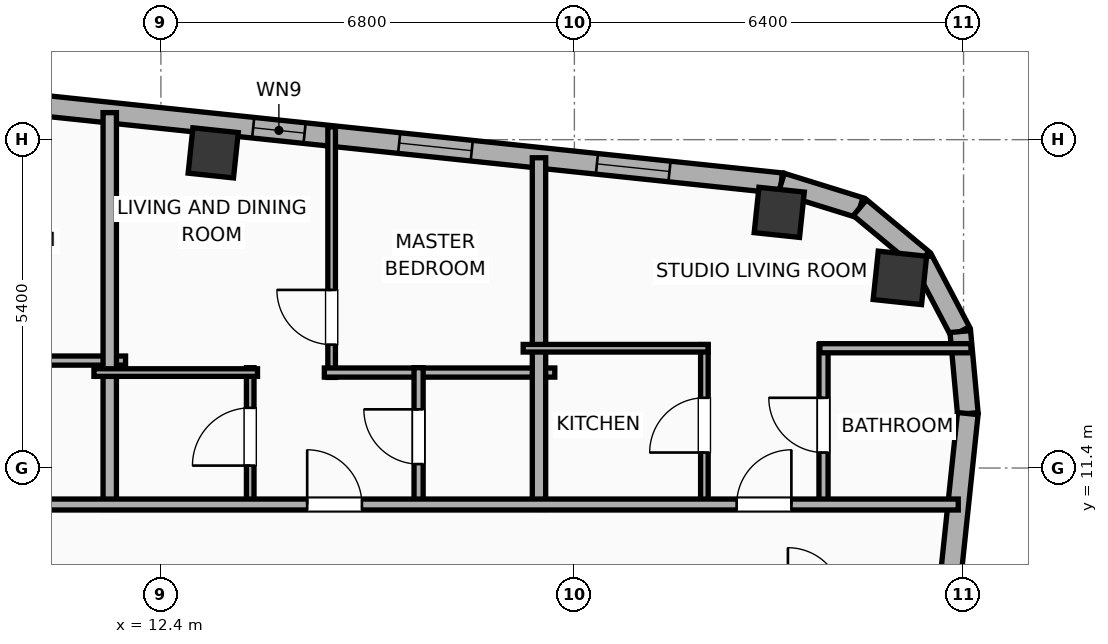
"""IFC4 building model, lengths in metres.
Left out: names, types, materials, properties, quantities, classifications, styles, units other than length and angle.
Written with IfcOpenShell. Run it as: python <this file> out.ifc"""

import sys

from ifc_helpers import new_model, si_unit, direction, frame, frame_2d, origin, origin_2d, place, context, subcontext, project, spatial, rectangle, hollow_rectangle, hollow_circle, extrude, element, fill, save


model = new_model("IFC4")
c1 = context("Model", 3, precision=1e-05, world=origin(), true_north=direction((0.0, 1.0)))
c2 = subcontext(c1, "Body", "Model", "MODEL_VIEW")
j1 = project(units=[si_unit("LENGTHUNIT", "METRE"), si_unit("PLANEANGLEUNIT", "RADIAN")], contexts=[c1])
p1 = place(None, origin())
s1 = spatial("IfcSite", under=j1, at=p1, CompositionType="ELEMENT")
p2 = place(p1, origin())
s2 = spatial("IfcBuilding", under=s1, at=p2, CompositionType="ELEMENT")
p3 = place(p2, frame((0.0, 0.0, 279.5)))
s3 = spatial("IfcBuildingStorey", under=s2, at=p3, CompositionType="ELEMENT", Elevation=279.5)
p4 = place(p3, frame((24.553, 14.527, 0.0), z_axis=(0.0, 0.0, 1.0), x_axis=(0.994521895368, -0.104528463268, 0.0)))
e1 = element("IfcColumn", 1, at=p4, inside=s3, PredefinedType="COLUMN", context=c2, shape_type="SweptSolid", body=[
    extrude(hollow_circle(Radius=0.4, WallThickness=0.028, at=origin_2d()), origin(), (0.0, 0.0, 1.0), 3.9),
])
for number, where, z_axis, x_axis in (
    (2, (22.569, 15.604, 0.0), (0.0, 0.0, 1.0), (0.995, -0.105, 0.0)),
    (3, (13.26, 16.583, 0.0), (0.0, 0.0, 1.0), (0.995, -0.105, 0.0)),
):
    element("IfcColumn", number, at=place(p3, frame(where, z_axis=z_axis, x_axis=x_axis)), inside=s3, PredefinedType="COLUMN", context=c2, shape_type="SweptSolid", body=[
        extrude(hollow_rectangle(XDim=0.75, YDim=0.75, WallThickness=0.025, at=origin_2d()), origin(), (0.0, 0.0, 1.0), 3.9),
    ])
p5 = place(p3, frame((-23.908, 20.972, 0.0), z_axis=(0.0, 0.0, 1.0), x_axis=(0.994521888554, -0.104528528102, 0.0)))
e4 = element("IfcWall", 4, at=p5, inside=s3, PredefinedType="ELEMENTEDWALL", context=c2, shape_type="SweptSolid", body=[
    extrude(rectangle(XDim=46.766, YDim=0.34, at=frame_2d((23.383, 0.0))), origin(), (0.0, 0.0, 1.0), 3.65),
])
p6 = place(p5, frame((23.833, 0.0, 0.75)))
e5 = element("IfcOpeningElement", 5, at=p6, cuts=e4, PredefinedType="OPENING", context=c2, shape_type="SweptSolid", body=[
    extrude(rectangle(XDim=2.4, YDim=2.1, at=frame_2d((1.2, 1.05))), frame((0.0, 0.18, 0.0), z_axis=(0.0, -1.0, 0.0), x_axis=(1.0, 0.0, 0.0)), (0.0, 0.0, 1.0), 0.36),
])
p7 = place(p5, frame((1.243, 0.0, 0.75)))
e6 = element("IfcOpeningElement", 6, at=p7, cuts=e4, PredefinedType="OPENING", context=c2, shape_type="SweptSolid", body=[
    extrude(rectangle(XDim=1.2, YDim=2.05, at=frame_2d((0.6, 1.025))), frame((0.0, 0.18, 0.0), z_axis=(0.0, -1.0, 0.0), x_axis=(1.0, 0.0, 0.0)), (0.0, 0.0, 1.0), 0.36),
])
p8 = place(p5, frame((4.157, 0.0, 0.75)))
e7 = element("IfcOpeningElement", 7, at=p8, cuts=e4, PredefinedType="OPENING", context=c2, shape_type="SweptSolid", body=[
    extrude(rectangle(XDim=1.2, YDim=2.05, at=frame_2d((0.6, 1.025))), frame((0.0, 0.18, 0.0), z_axis=(0.0, -1.0, 0.0), x_axis=(1.0, 0.0, 0.0)), (0.0, 0.0, 1.0), 0.36),
])
p9 = place(p5, frame((7.475, 0.0, 0.75)))
e8 = element("IfcOpeningElement", 8, at=p9, cuts=e4, PredefinedType="OPENING", context=c2, shape_type="SweptSolid", body=[
    extrude(rectangle(XDim=1.2, YDim=2.05, at=frame_2d((0.6, 1.025))), frame((0.0, 0.18, 0.0), z_axis=(0.0, -1.0, 0.0), x_axis=(1.0, 0.0, 0.0)), (0.0, 0.0, 1.0), 0.36),
])
p10 = place(p5, frame((11.513, 0.0, 0.75)))
e9 = element("IfcOpeningElement", 9, at=p10, cuts=e4, PredefinedType="OPENING", context=c2, shape_type="SweptSolid", body=[
    extrude(rectangle(XDim=1.2, YDim=2.05, at=frame_2d((0.6, 1.025))), frame((0.0, 0.18, 0.0), z_axis=(0.0, -1.0, 0.0), x_axis=(1.0, 0.0, 0.0)), (0.0, 0.0, 1.0), 0.36),
])
p11 = place(p5, frame((15.192, 0.0, 0.75)))
e10 = element("IfcOpeningElement", 10, at=p11, cuts=e4, PredefinedType="OPENING", context=c2, shape_type="SweptSolid", body=[
    extrude(rectangle(XDim=1.2, YDim=2.05, at=frame_2d((0.6, 1.025))), frame((0.0, 0.18, 0.0), z_axis=(0.0, -1.0, 0.0), x_axis=(1.0, 0.0, 0.0)), (0.0, 0.0, 1.0), 0.36),
])
p12 = place(p5, frame((19.671, 0.0, 0.75)))
e11 = element("IfcOpeningElement", 11, at=p12, cuts=e4, PredefinedType="OPENING", context=c2, shape_type="SweptSolid", body=[
    extrude(rectangle(XDim=1.2, YDim=2.05, at=frame_2d((0.6, 1.025))), frame((0.0, 0.18, 0.0), z_axis=(0.0, -1.0, 0.0), x_axis=(1.0, 0.0, 0.0)), (0.0, 0.0, 1.0), 0.36),
])
p13 = place(p5, frame((29.801, 0.0, 0.75)))
e12 = element("IfcOpeningElement", 12, at=p13, cuts=e4, PredefinedType="OPENING", context=c2, shape_type="SweptSolid", body=[
    extrude(rectangle(XDim=1.2, YDim=2.05, at=frame_2d((0.6, 1.025))), frame((0.0, 0.18, 0.0), z_axis=(0.0, -1.0, 0.0), x_axis=(1.0, 0.0, 0.0)), (0.0, 0.0, 1.0), 0.36),
])
p14 = place(p5, frame((33.35, 0.0, 0.75)))
e13 = element("IfcOpeningElement", 13, at=p14, cuts=e4, PredefinedType="OPENING", context=c2, shape_type="SweptSolid", body=[
    extrude(rectangle(XDim=1.2, YDim=2.05, at=frame_2d((0.6, 1.025))), frame((0.0, 0.18, 0.0), z_axis=(0.0, -1.0, 0.0), x_axis=(1.0, 0.0, 0.0)), (0.0, 0.0, 1.0), 0.36),
])
p15 = place(p5, frame((38.034, 0.0, 0.75)))
e14 = element("IfcOpeningElement", 14, at=p15, cuts=e4, PredefinedType="OPENING", context=c2, shape_type="SweptSolid", body=[
    extrude(rectangle(XDim=0.85, YDim=2.05, at=frame_2d((0.425, 1.025))), frame((0.0, 0.18, 0.0), z_axis=(0.0, -1.0, 0.0), x_axis=(1.0, 0.0, 0.0)), (0.0, 0.0, 1.0), 0.36),
])
p16 = place(p5, frame((40.448, 0.0, 0.75)))
e15 = element("IfcOpeningElement", 15, at=p16, cuts=e4, PredefinedType="OPENING", context=c2, shape_type="SweptSolid", body=[
    extrude(rectangle(XDim=1.2, YDim=2.05, at=frame_2d((0.6, 1.025))), frame((0.0, 0.18, 0.0), z_axis=(0.0, -1.0, 0.0), x_axis=(1.0, 0.0, 0.0)), (0.0, 0.0, 1.0), 0.36),
])
p17 = place(p5, frame((43.718, 0.0, 0.75)))
e16 = element("IfcOpeningElement", 16, at=p17, cuts=e4, PredefinedType="OPENING", context=c2, shape_type="SweptSolid", body=[
    extrude(rectangle(XDim=1.2, YDim=2.05, at=frame_2d((0.6, 1.025))), frame((0.0, 0.18, 0.0), z_axis=(0.0, -1.0, 0.0), x_axis=(1.0, 0.0, 0.0)), (0.0, 0.0, 1.0), 0.36),
])
p18 = place(p3, frame((22.603, 16.084, 0.0), z_axis=(0.0, 0.0, 1.0), x_axis=(0.955007802701, -0.296580674994, 0.0)))
e17 = element("IfcWall", 17, at=p18, inside=s3, PredefinedType="ELEMENTEDWALL", context=c2, shape_type="SweptSolid", body=[
    extrude(rectangle(XDim=1.354, YDim=0.34, at=frame_2d((0.677, 0.0))), origin(), (0.0, 0.0, 1.0), 3.65),
])
for number, where, z_axis, x_axis in (
    (18, (23.896, 15.682, 0.0), (0.0, 0.0, 1.0), (0.769, -0.64, 0.0)),
    (19, (24.924, 14.827, 0.0), (0.0, 0.0, 1.0), (0.466, -0.885, 0.0)),
):
    element("IfcWall", number, at=place(p3, frame(where, z_axis=z_axis, x_axis=x_axis)), inside=s3, PredefinedType="ELEMENTEDWALL", context=c2, shape_type="SweptSolid", body=[
        extrude(rectangle(XDim=1.337, YDim=0.34, at=frame_2d((0.668, 0.0))), origin(), (0.0, 0.0, 1.0), 3.65),
    ])
p19 = place(p3, frame((25.546, 13.644, 0.0), z_axis=(0.0, 0.0, 1.0), x_axis=(0.091592370975, -0.995796584438, 0.0)))
e20 = element("IfcWall", 20, at=p19, inside=s3, PredefinedType="ELEMENTEDWALL", context=c2, shape_type="SweptSolid", body=[
    extrude(rectangle(XDim=1.354, YDim=0.34, at=frame_2d((0.677, 0.0))), origin(), (0.0, 0.0, 1.0), 3.65),
])
p20 = place(p3, frame((25.67, 12.296, 0.0), z_axis=(0.0, 0.0, 1.0), x_axis=(-0.104533282919, -0.994521388791, 0.0)))
e21 = element("IfcWall", 21, at=p20, inside=s3, PredefinedType="ELEMENTEDWALL", context=c2, shape_type="SweptSolid", body=[
    extrude(rectangle(XDim=30.366, YDim=0.34, at=frame_2d((15.183, 0.0))), origin(), (0.0, 0.0, 1.0), 3.65),
])
p21 = place(p20, frame((5.842, 0.0, 0.75)))
e22 = element("IfcOpeningElement", 22, at=p21, cuts=e21, PredefinedType="OPENING", context=c2, shape_type="SweptSolid", body=[
    extrude(rectangle(XDim=1.8, YDim=2.1, at=frame_2d((0.9, 1.05))), frame((0.0, 0.18, 0.0), z_axis=(0.0, -1.0, 0.0), x_axis=(1.0, 0.0, 0.0)), (0.0, 0.0, 1.0), 0.36),
])
p22 = place(p20, frame((23.525, 0.0, 0.75)))
e23 = element("IfcOpeningElement", 23, at=p22, cuts=e21, PredefinedType="OPENING", context=c2, shape_type="SweptSolid", body=[
    extrude(rectangle(XDim=1.8, YDim=2.1, at=frame_2d((0.9, 1.05))), frame((0.0, 0.18, 0.0), z_axis=(0.0, -1.0, 0.0), x_axis=(1.0, 0.0, 0.0)), (0.0, 0.0, 1.0), 0.36),
])
p23 = place(p20, frame((27.368, 0.0, 0.75)))
e24 = element("IfcOpeningElement", 24, at=p23, cuts=e21, PredefinedType="OPENING", context=c2, shape_type="SweptSolid", body=[
    extrude(rectangle(XDim=1.2, YDim=2.05, at=frame_2d((0.6, 1.025))), frame((0.0, 0.18, 0.0), z_axis=(0.0, -1.0, 0.0), x_axis=(1.0, 0.0, 0.0)), (0.0, 0.0, 1.0), 0.36),
])
p24 = place(p20, frame((18.181, 0.0, 0.75)))
e25 = element("IfcOpeningElement", 25, at=p24, cuts=e21, PredefinedType="OPENING", context=c2, shape_type="SweptSolid", body=[
    extrude(rectangle(XDim=1.2, YDim=2.05, at=frame_2d((0.6, 1.025))), frame((0.0, 0.18, 0.0), z_axis=(0.0, -1.0, 0.0), x_axis=(1.0, 0.0, 0.0)), (0.0, 0.0, 1.0), 0.36),
])
p25 = place(p3, frame((8.029, 13.167, 0.0), z_axis=(0.0, 0.0, 1.0), x_axis=(1.0, 0.0, 0.0)))
e26 = element("IfcWall", 26, at=p25, inside=s3, PredefinedType="PLUMBINGWALL", context=c2, shape_type="SweptSolid", body=[
    extrude(rectangle(XDim=3.79, YDim=0.15, at=frame_2d((1.895, 0.0))), origin(), (0.0, 0.0, 1.0), 3.65),
])
p26 = place(p3, frame((11.559, 10.72, 0.0), z_axis=(0.0, 0.0, 1.0), x_axis=(0.0, 1.0, 0.0)))
e27 = element("IfcWall", 27, at=p26, inside=s3, PredefinedType="PARTITIONING", context=c2, shape_type="SweptSolid", body=[
    extrude(rectangle(XDim=6.524, YDim=0.22, at=frame_2d((3.262, 0.0))), origin(), (0.0, 0.0, 1.0), 3.65),
])
p27 = place(p3, frame((15.208, 12.89, 0.0), z_axis=(0.0, 0.0, 1.0), x_axis=(0.0, 1.0, 0.0)))
e28 = element("IfcWall", 28, at=p27, inside=s3, PredefinedType="PARTITIONING", context=c2, shape_type="SweptSolid", body=[
    extrude(rectangle(XDim=4.122, YDim=0.125, at=frame_2d((2.061, 0.0))), origin(), (0.0, 0.0, 1.0), 3.65),
])
p28 = place(p27, frame((0.539, 0.0, 0.0)))
e29 = element("IfcOpeningElement", 29, at=p28, cuts=e28, PredefinedType="OPENING", context=c2, shape_type="SweptSolid", body=[
    extrude(rectangle(XDim=0.9, YDim=2.05, at=frame_2d((0.45, 1.025))), frame((0.0, 0.073, 0.0), z_axis=(0.0, -1.0, 0.0), x_axis=(1.0, 0.0, 0.0)), (0.0, 0.0, 1.0), 0.145),
])
p29 = place(p3, frame((15.088, 12.97, 0.0), z_axis=(0.0, 0.0, 1.0), x_axis=(1.0, 0.0, 0.0)))
e30 = element("IfcWall", 30, at=p29, inside=s3, PredefinedType="PLUMBINGWALL", context=c2, shape_type="SweptSolid", body=[
    extrude(rectangle(XDim=3.79, YDim=0.15, at=frame_2d((1.895, 0.0))), origin(), (0.0, 0.0, 1.0), 3.65),
])
p30 = place(p3, frame((13.869, 10.78, 0.0), z_axis=(0.0, 0.0, 1.0), x_axis=(0.0, 1.0, 0.0)))
e31 = element("IfcWall", 31, at=p30, inside=s3, PredefinedType="PARTITIONING", context=c2, shape_type="SweptSolid", body=[
    extrude(rectangle(XDim=2.27, YDim=0.125, at=frame_2d((1.135, 0.0))), origin(), (0.0, 0.0, 1.0), 3.65),
])
p31 = place(p30, frame((0.66, 0.0, 0.0)))
e32 = element("IfcOpeningElement", 32, at=p31, cuts=e31, PredefinedType="OPENING", context=c2, shape_type="SweptSolid", body=[
    extrude(rectangle(XDim=0.95, YDim=2.05, at=frame_2d((0.475, 1.025))), frame((0.0, 0.073, 0.0), z_axis=(0.0, -1.0, 0.0), x_axis=(1.0, 0.0, 0.0)), (0.0, 0.0, 1.0), 0.145),
])
p32 = place(p3, frame((11.299, 12.97, 0.0), z_axis=(0.0, 0.0, 1.0), x_axis=(1.0, 0.0, 0.0)))
e33 = element("IfcWall", 33, at=p32, inside=s3, PredefinedType="PARTITIONING", context=c2, shape_type="SweptSolid", body=[
    extrude(rectangle(XDim=2.69, YDim=0.125, at=frame_2d((1.345, 0.0))), origin(), (0.0, 0.0, 1.0), 3.65),
])
p33 = place(p3, frame((16.638, 10.78, 0.0), z_axis=(0.0, 0.0, 1.0), x_axis=(0.0, 1.0, 0.0)))
e34 = element("IfcWall", 34, at=p33, inside=s3, PredefinedType="PLUMBINGWALL", context=c2, shape_type="SweptSolid", body=[
    extrude(rectangle(XDim=2.27, YDim=0.15, at=frame_2d((1.135, 0.0))), origin(), (0.0, 0.0, 1.0), 3.65),
])
p34 = place(p33, frame((0.685, 0.0, 0.0)))
e35 = element("IfcOpeningElement", 35, at=p34, cuts=e34, PredefinedType="OPENING", context=c2, shape_type="SweptSolid", body=[
    extrude(rectangle(XDim=0.9, YDim=2.05, at=frame_2d((0.45, 1.025))), frame((0.0, 0.085, 0.0), z_axis=(0.0, -1.0, 0.0), x_axis=(1.0, 0.0, 0.0)), (0.0, 0.0, 1.0), 0.17),
])
p35 = place(p3, frame((18.618, 10.72, 0.0), z_axis=(0.0, 0.0, 1.0), x_axis=(0.0, 1.0, 0.0)))
e36 = element("IfcWall", 36, at=p35, inside=s3, PredefinedType="PARTITIONING", context=c2, shape_type="SweptSolid", body=[
    extrude(rectangle(XDim=5.782, YDim=0.22, at=frame_2d((2.891, 0.0))), origin(), (0.0, 0.0, 1.0), 3.65),
])
p36 = place(p3, frame((21.338, 10.78, 0.0), z_axis=(0.0, 0.0, 1.0), x_axis=(0.0, 1.0, 0.0)))
e37 = element("IfcWall", 37, at=p36, inside=s3, PredefinedType="PARTITIONING", context=c2, shape_type="SweptSolid", body=[
    extrude(rectangle(XDim=2.65, YDim=0.125, at=frame_2d((1.325, 0.0))), origin(), (0.0, 0.0, 1.0), 3.09),
])
p37 = place(p36, frame((0.875, 0.0, 0.0)))
e38 = element("IfcOpeningElement", 38, at=p37, cuts=e37, PredefinedType="OPENING", context=c2, shape_type="SweptSolid", body=[
    extrude(rectangle(XDim=0.9, YDim=2.05, at=frame_2d((0.45, 1.025))), frame((0.0, 0.073, 0.0), z_axis=(0.0, -1.0, 0.0), x_axis=(1.0, 0.0, 0.0)), (0.0, 0.0, 1.0), 0.145),
])
p38 = place(p3, frame((23.297, 10.78, 0.0), z_axis=(0.0, 0.0, 1.0), x_axis=(0.0, 1.0, 0.0)))
e39 = element("IfcWall", 39, at=p38, inside=s3, PredefinedType="PLUMBINGWALL", context=c2, shape_type="SweptSolid", body=[
    extrude(rectangle(XDim=2.65, YDim=0.15, at=frame_2d((1.325, 0.0))), origin(), (0.0, 0.0, 1.0), 3.65),
])
p39 = place(p38, frame((0.875, 0.0, 0.0)))
e40 = element("IfcOpeningElement", 40, at=p39, cuts=e39, PredefinedType="OPENING", context=c2, shape_type="SweptSolid", body=[
    extrude(rectangle(XDim=0.9, YDim=2.05, at=frame_2d((0.45, 1.025))), frame((0.0, 0.085, 0.0), z_axis=(0.0, -1.0, 0.0), x_axis=(1.0, 0.0, 0.0)), (0.0, 0.0, 1.0), 0.17),
])
p40 = place(p3, frame((18.358, 13.37, 0.0), z_axis=(0.0, 0.0, 1.0), x_axis=(1.0, 0.0, 0.0)))
e41 = element("IfcWall", 41, at=p40, inside=s3, PredefinedType="PARTITIONING", context=c2, shape_type="SweptSolid", body=[
    extrude(rectangle(XDim=3.04, YDim=0.125, at=frame_2d((1.52, 0.0))), origin(), (0.0, 0.0, 1.0), 3.65),
])
p41 = place(p3, frame((23.237, 13.37, 0.0), z_axis=(0.0, 0.0, 1.0), x_axis=(1.0, 0.0, 0.0)))
e42 = element("IfcWall", 42, at=p41, inside=s3, PredefinedType="PLUMBINGWALL", context=c2, shape_type="SweptSolid", body=[
    extrude(rectangle(XDim=2.485, YDim=0.15, at=frame_2d((1.242, 0.0))), origin(), (0.0, 0.0, 1.0), 3.65),
])
p42 = place(p3, frame((-28.443, 10.8, 0.0), z_axis=(0.0, 0.0, 1.0), x_axis=(1.0, 0.0, 0.0)))
e43 = element("IfcWall", 43, at=p42, inside=s3, PredefinedType="PARTITIONING", context=c2, shape_type="SweptSolid", body=[
    extrude(rectangle(XDim=53.956, YDim=0.18, at=frame_2d((26.978, 0.0))), origin(), (0.0, 0.0, 1.0), 3.65),
])
p43 = place(p42, frame((3.213, 0.0, 0.0)))
e44 = element("IfcOpeningElement", 44, at=p43, cuts=e43, PredefinedType="OPENING", context=c2, shape_type="SweptSolid", body=[
    extrude(rectangle(XDim=1.15, YDim=2.05, at=frame_2d((0.575, 1.025))), frame((0.0, 0.1, 0.0), z_axis=(0.0, -1.0, 0.0), x_axis=(1.0, 0.0, 0.0)), (0.0, 0.0, 1.0), 0.2),
])
p44 = place(p42, frame((10.556, 0.0, 0.0)))
e45 = element("IfcOpeningElement", 45, at=p44, cuts=e43, PredefinedType="OPENING", context=c2, shape_type="SweptSolid", body=[
    extrude(rectangle(XDim=1.15, YDim=2.05, at=frame_2d((0.575, 1.025))), frame((0.0, 0.1, 0.0), z_axis=(0.0, -1.0, 0.0), x_axis=(1.0, 0.0, 0.0)), (0.0, 0.0, 1.0), 0.2),
])
p45 = place(p42, frame((17.872, 0.0, 0.0)))
e46 = element("IfcOpeningElement", 46, at=p45, cuts=e43, PredefinedType="OPENING", context=c2, shape_type="SweptSolid", body=[
    extrude(rectangle(XDim=1.15, YDim=2.05, at=frame_2d((0.575, 1.025))), frame((0.0, 0.1, 0.0), z_axis=(0.0, -1.0, 0.0), x_axis=(1.0, 0.0, 0.0)), (0.0, 0.0, 1.0), 0.2),
])
p46 = place(p42, frame((24.45, 0.0, 0.0)))
e47 = element("IfcOpeningElement", 47, at=p46, cuts=e43, PredefinedType="OPENING", context=c2, shape_type="SweptSolid", body=[
    extrude(rectangle(XDim=0.9, YDim=2.05, at=frame_2d((0.45, 1.025))), frame((0.0, 0.1, 0.0), z_axis=(0.0, -1.0, 0.0), x_axis=(1.0, 0.0, 0.0)), (0.0, 0.0, 1.0), 0.2),
])
p47 = place(p42, frame((29.954, 0.0, 0.0)))
e48 = element("IfcOpeningElement", 48, at=p47, cuts=e43, PredefinedType="OPENING", context=c2, shape_type="SweptSolid", body=[
    extrude(rectangle(XDim=0.9, YDim=2.05, at=frame_2d((0.45, 1.025))), frame((0.0, 0.1, 0.0), z_axis=(0.0, -1.0, 0.0), x_axis=(1.0, 0.0, 0.0)), (0.0, 0.0, 1.0), 0.2),
])
p48 = place(p42, frame((36.186, 0.0, 0.0)))
e49 = element("IfcOpeningElement", 49, at=p48, cuts=e43, PredefinedType="OPENING", context=c2, shape_type="SweptSolid", body=[
    extrude(rectangle(XDim=0.9, YDim=2.05, at=frame_2d((0.45, 1.025))), frame((0.0, 0.1, 0.0), z_axis=(0.0, -1.0, 0.0), x_axis=(1.0, 0.0, 0.0)), (0.0, 0.0, 1.0), 0.2),
])
p49 = place(p42, frame((43.249, 0.0, 0.0)))
e50 = element("IfcOpeningElement", 50, at=p49, cuts=e43, PredefinedType="OPENING", context=c2, shape_type="SweptSolid", body=[
    extrude(rectangle(XDim=0.9, YDim=2.05, at=frame_2d((0.45, 1.025))), frame((0.0, 0.1, 0.0), z_axis=(0.0, -1.0, 0.0), x_axis=(1.0, 0.0, 0.0)), (0.0, 0.0, 1.0), 0.2),
])
p50 = place(p42, frame((50.311, 0.0, 0.0)))
e51 = element("IfcOpeningElement", 51, at=p50, cuts=e43, PredefinedType="OPENING", context=c2, shape_type="SweptSolid", body=[
    extrude(rectangle(XDim=0.9, YDim=2.05, at=frame_2d((0.45, 1.025))), frame((0.0, 0.1, 0.0), z_axis=(0.0, -1.0, 0.0), x_axis=(1.0, 0.0, 0.0)), (0.0, 0.0, 1.0), 0.2),
])
p51 = place(p15, origin())
e52 = element("IfcWindow", 52, at=p51, inside=s3, PartitioningType="SINGLE_PANEL", PredefinedType="WINDOW", context=c2, shape_type="SweptSolid", body=[
    extrude(rectangle(XDim=0.85, YDim=2.05, at=frame_2d((0.425, 1.025))), frame((0.0, 0.03, 0.0), z_axis=(0.0, -1.0, 0.0), x_axis=(1.0, 0.0, 0.0)), (0.0, 0.0, 1.0), 0.06),
])
fill(e14, e52)
p52 = place(p16, origin())
e53 = element("IfcWindow", 53, at=p52, inside=s3, PartitioningType="SINGLE_PANEL", PredefinedType="WINDOW", context=c2, shape_type="SweptSolid", body=[
    extrude(rectangle(XDim=1.2, YDim=2.05, at=frame_2d((0.6, 1.025))), frame((0.0, 0.03, 0.0), z_axis=(0.0, -1.0, 0.0), x_axis=(1.0, 0.0, 0.0)), (0.0, 0.0, 1.0), 0.06),
])
fill(e15, e53)
p53 = place(p17, origin())
e54 = element("IfcWindow", 54, at=p53, inside=s3, PartitioningType="SINGLE_PANEL", PredefinedType="WINDOW", context=c2, shape_type="SweptSolid", body=[
    extrude(rectangle(XDim=1.2, YDim=2.05, at=frame_2d((0.6, 1.025))), frame((0.0, 0.03, 0.0), z_axis=(0.0, -1.0, 0.0), x_axis=(1.0, 0.0, 0.0)), (0.0, 0.0, 1.0), 0.06),
])
fill(e16, e54)
p54 = place(p28, origin())
e55 = element("IfcDoor", 55, at=p54, inside=s3, OperationType="SINGLE_SWING_RIGHT", PredefinedType="DOOR", context=c2, shape_type="SweptSolid", body=[
    extrude(rectangle(XDim=0.9, YDim=2.05, at=frame_2d((0.45, 1.025))), frame((0.0, 0.025, 0.0), z_axis=(0.0, -1.0, 0.0), x_axis=(1.0, 0.0, 0.0)), (0.0, 0.0, 1.0), 0.05),
])
fill(e29, e55)
p55 = place(p31, origin())
e56 = element("IfcDoor", 56, at=p55, inside=s3, OperationType="SINGLE_SWING_LEFT", PredefinedType="DOOR", context=c2, shape_type="SweptSolid", body=[
    extrude(rectangle(XDim=0.95, YDim=2.05, at=frame_2d((0.475, 1.025))), frame((0.0, 0.025, 0.0), z_axis=(0.0, -1.0, 0.0), x_axis=(1.0, 0.0, 0.0)), (0.0, 0.0, 1.0), 0.05),
])
fill(e32, e56)
p56 = place(p34, origin())
e57 = element("IfcDoor", 57, at=p56, inside=s3, OperationType="SINGLE_SWING_RIGHT", PredefinedType="DOOR", context=c2, shape_type="SweptSolid", body=[
    extrude(rectangle(XDim=0.9, YDim=2.05, at=frame_2d((0.45, 1.025))), frame((0.0, 0.025, 0.0), z_axis=(0.0, -1.0, 0.0), x_axis=(1.0, 0.0, 0.0)), (0.0, 0.0, 1.0), 0.05),
])
fill(e35, e57)
p57 = place(p37, origin())
e58 = element("IfcDoor", 58, at=p57, inside=s3, OperationType="SINGLE_SWING_LEFT", PredefinedType="DOOR", context=c2, shape_type="SweptSolid", body=[
    extrude(rectangle(XDim=0.9, YDim=2.05, at=frame_2d((0.45, 1.025))), frame((0.0, 0.025, 0.0), z_axis=(0.0, -1.0, 0.0), x_axis=(1.0, 0.0, 0.0)), (0.0, 0.0, 1.0), 0.05),
])
fill(e38, e58)
p58 = place(p39, origin())
e59 = element("IfcDoor", 59, at=p58, inside=s3, OperationType="SINGLE_SWING_RIGHT", PredefinedType="DOOR", context=c2, shape_type="SweptSolid", body=[
    extrude(rectangle(XDim=0.9, YDim=2.05, at=frame_2d((0.45, 1.025))), frame((0.0, 0.025, 0.0), z_axis=(0.0, -1.0, 0.0), x_axis=(1.0, 0.0, 0.0)), (0.0, 0.0, 1.0), 0.05),
])
fill(e40, e59)
p59 = place(p49, origin())
e60 = element("IfcDoor", 60, at=p59, inside=s3, OperationType="SINGLE_SWING_LEFT", PredefinedType="DOOR", context=c2, shape_type="SweptSolid", body=[
    extrude(rectangle(XDim=0.9, YDim=2.05, at=frame_2d((0.45, 1.025))), frame((0.0, 0.025, 0.0), z_axis=(0.0, -1.0, 0.0), x_axis=(1.0, 0.0, 0.0)), (0.0, 0.0, 1.0), 0.05),
])
fill(e50, e60)
p60 = place(p50, origin())
e61 = element("IfcDoor", 61, at=p60, inside=s3, OperationType="SINGLE_SWING_RIGHT", PredefinedType="DOOR", context=c2, shape_type="SweptSolid", body=[
    extrude(rectangle(XDim=0.9, YDim=2.05, at=frame_2d((0.45, 1.025))), frame((0.0, 0.025, 0.0), z_axis=(0.0, -1.0, 0.0), x_axis=(1.0, 0.0, 0.0)), (0.0, 0.0, 1.0), 0.05),
])
fill(e51, e61)
save(model, sys.argv[1])
